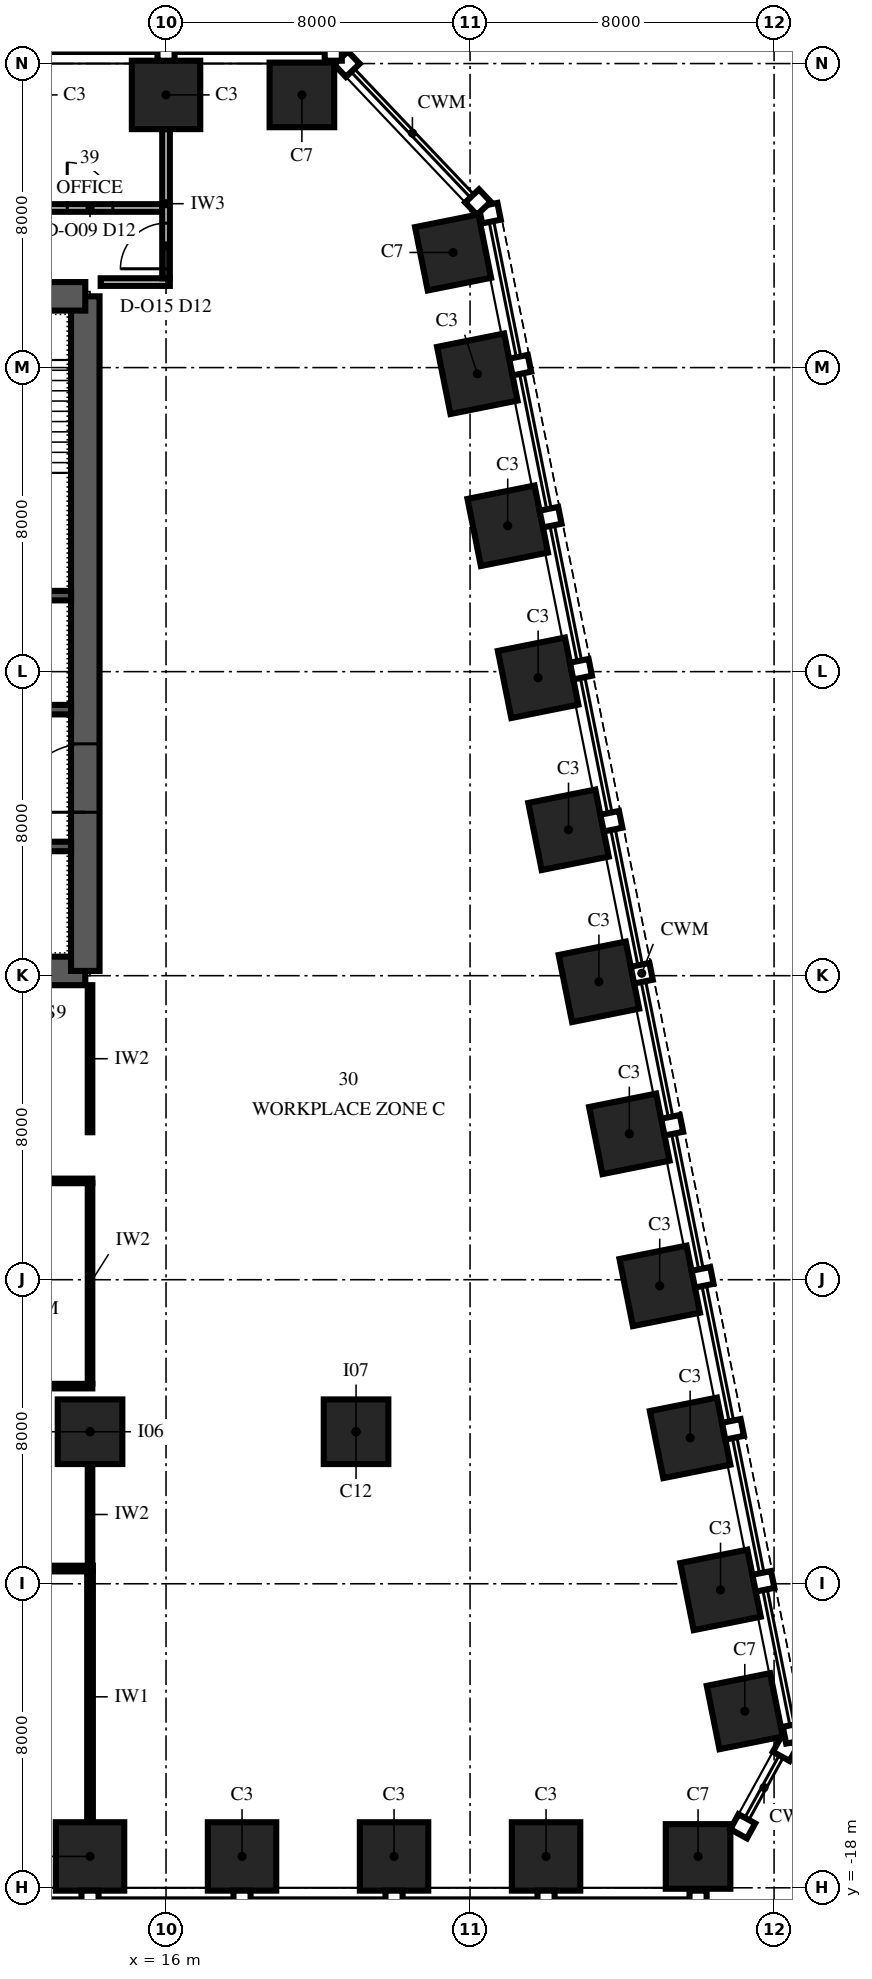
"""IFC4 building model, lengths in metres.
Left out: names, types, materials, properties, quantities, classifications, styles, units other than length and angle.
Written with IfcOpenShell. Run it as: python <this file> out.ifc"""

import sys

from ifc_helpers import new_model, si_unit, direction, frame, frame_2d, origin, origin_2d, place, context, subcontext, project, spatial, polyline, rectangle, outline, extrude, element, fill, save


model = new_model("IFC4")
c1 = context("Model", 3, precision=1e-05, world=origin(), true_north=direction((0.0, 1.0)))
c2 = subcontext(c1, "Body", "Model", "MODEL_VIEW")
j1 = project(units=[si_unit("LENGTHUNIT", "METRE"), si_unit("PLANEANGLEUNIT", "RADIAN")], contexts=[c1])
p1 = place(None, origin())
s1 = spatial("IfcSite", under=j1, at=p1, CompositionType="ELEMENT")
p2 = place(p1, origin())
s2 = spatial("IfcBuilding", under=s1, at=p2, CompositionType="ELEMENT")
p3 = place(p2, frame((0.0, 0.0, 127.0)))
s3 = spatial("IfcBuildingStorey", under=s2, at=p3, CompositionType="ELEMENT", Elevation=127.0)
for number, where, z_axis, x_axis in (
    (1, (14.0, -17.175, 0.0), (0.0, 0.0, 1.0), (1.0, 0.0, 0.0)),
    (2, (18.0, -17.175, 0.0), (0.0, 0.0, 1.0), (1.0, 0.0, 0.0)),
    (3, (22.0, -17.175, 0.0), (0.0, 0.0, 1.0), (1.0, 0.0, 0.0)),
    (4, (26.0, -17.175, 0.0), (0.0, 0.0, 1.0), (1.0, 0.0, 0.0)),
):
    element("IfcColumn", number, at=place(p3, frame(where, z_axis=z_axis, x_axis=x_axis)), inside=s3, PredefinedType="COLUMN", context=c2, shape_type="SweptSolid", body=[
        extrude(rectangle(XDim=1.8, YDim=1.8, at=origin_2d()), origin(), (0.0, 0.0, 1.0), 4.0),
    ])
for number, where, z_axis, x_axis in (
    (5, (30.0, -17.175, 0.0), (0.0, 0.0, 1.0), (1.0, 0.0, 0.0)),
    (6, (31.229, -13.353, 0.0), (0.0, 0.0, 1.0), (-0.196, 0.981, 0.0)),
):
    element("IfcColumn", number, at=place(p3, frame(where, z_axis=z_axis, x_axis=x_axis)), inside=s3, PredefinedType="COLUMN", context=c2, shape_type="SweptSolid", body=[
        extrude(rectangle(XDim=1.7, YDim=1.7, at=origin_2d()), origin(), (0.0, 0.0, 1.0), 4.0),
    ])
for number, where, z_axis, x_axis in (
    (7, (30.591, -10.162, 0.0), (0.0, 0.0, 1.0), (-0.196, 0.981, 0.0)),
    (8, (29.791, -6.162, 0.0), (0.0, 0.0, 1.0), (-0.196, 0.981, 0.0)),
    (9, (28.991, -2.162, 0.0), (0.0, 0.0, 1.0), (-0.196, 0.981, 0.0)),
    (10, (28.191, 1.838, 0.0), (0.0, 0.0, 1.0), (-0.196, 0.981, 0.0)),
    (11, (27.391, 5.838, 0.0), (0.0, 0.0, 1.0), (-0.196, 0.981, 0.0)),
    (12, (26.591, 9.838, 0.0), (0.0, 0.0, 1.0), (-0.196, 0.981, 0.0)),
    (13, (25.791, 13.838, 0.0), (0.0, 0.0, 1.0), (-0.196, 0.981, 0.0)),
    (14, (24.991, 17.838, 0.0), (0.0, 0.0, 1.0), (-0.196, 0.981, 0.0)),
    (15, (24.191, 21.838, 0.0), (0.0, 0.0, 1.0), (-0.196, 0.981, 0.0)),
):
    element("IfcColumn", number, at=place(p3, frame(where, z_axis=z_axis, x_axis=x_axis)), inside=s3, PredefinedType="COLUMN", context=c2, shape_type="SweptSolid", body=[
        extrude(rectangle(XDim=1.8, YDim=1.8, at=origin_2d()), origin(), (0.0, 0.0, 1.0), 4.0),
    ])
for number, where, z_axis, x_axis in (
    (16, (23.553, 25.029, 0.0), (0.0, 0.0, 1.0), (-0.196, 0.981, 0.0)),
    (17, (19.575, 29.175, 0.0), (0.0, 0.0, 1.0), (-1.0, 0.0, 0.0)),
):
    element("IfcColumn", number, at=place(p3, frame(where, z_axis=z_axis, x_axis=x_axis)), inside=s3, PredefinedType="COLUMN", context=c2, shape_type="SweptSolid", body=[
        extrude(rectangle(XDim=1.7, YDim=1.7, at=origin_2d()), origin(), (0.0, 0.0, 1.0), 4.0),
    ])
p4 = place(p3, frame((16.0, 29.175, 0.0), z_axis=(0.0, 0.0, 1.0), x_axis=(-1.0, 0.0, 0.0)))
e18 = element("IfcColumn", 18, at=p4, inside=s3, PredefinedType="COLUMN", context=c2, shape_type="SweptSolid", body=[
    extrude(rectangle(XDim=1.8, YDim=1.8, at=origin_2d()), origin(), (0.0, 0.0, 1.0), 4.0),
])
for number, where, z_axis, x_axis in (
    (19, (14.0, -6.0, 0.0), (0.0, 0.0, 1.0), (1.0, 0.0, 0.0)),
    (20, (21.0, -6.0, 0.0), (0.0, 0.0, 1.0), (1.0, 0.0, 0.0)),
):
    element("IfcColumn", number, at=place(p3, frame(where, z_axis=z_axis, x_axis=x_axis)), inside=s3, PredefinedType="COLUMN", context=c2, shape_type="SweptSolid", body=[
        extrude(rectangle(XDim=1.7, YDim=1.7, at=origin_2d()), origin(), (0.0, 0.0, 1.0), 4.0),
    ])
p5 = place(p3, frame((-13.875, 6.125, 0.0), z_axis=(0.0, 0.0, 1.0), x_axis=(1.0, 0.0, 0.0)))
e21 = element("IfcWall", 21, at=p5, inside=s3, PredefinedType="SHEAR", context=c2, shape_type="SweptSolid", body=[
    extrude(rectangle(XDim=27.75, YDim=0.75, at=frame_2d((13.875, 0.0))), origin(), (0.0, 0.0, 1.0), 4.0),
])
p6 = place(p3, frame((13.875, 6.125, 0.0), z_axis=(0.0, 0.0, 1.0), x_axis=(0.0, 1.0, 0.0)))
e22 = element("IfcWall", 22, at=p6, inside=s3, PredefinedType="SHEAR", context=c2, shape_type="SweptSolid", body=[
    extrude(outline(polyline([(0.0, -0.375), (17.75, -0.375), (17.75, 0.0), (17.375, 0.0), (17.375, 0.375), (0.375, 0.375), (0.375, 0.0), (0.0, 0.0), (0.0, -0.375)])), origin(), (0.0, 0.0, 1.0), 4.0),
])
p7 = place(p6, frame((4.175, 0.0, 0.0)))
e23 = element("IfcOpeningElement", 23, at=p7, cuts=e22, PredefinedType="OPENING", context=c2, shape_type="SweptSolid", body=[
    extrude(rectangle(XDim=1.8, YDim=2.4, at=frame_2d((0.9, 1.2))), frame((0.0, 0.39, 0.0), z_axis=(0.0, -1.0, 0.0), x_axis=(1.0, 0.0, 0.0)), (0.0, 0.0, 1.0), 0.78),
])
p8 = place(p3, frame((13.875, 23.875, 0.0), z_axis=(0.0, 0.0, 1.0), x_axis=(-1.0, 0.0, 0.0)))
e24 = element("IfcWall", 24, at=p8, inside=s3, PredefinedType="SHEAR", context=c2, shape_type="SweptSolid", body=[
    extrude(rectangle(XDim=27.75, YDim=0.75, at=frame_2d((13.875, 0.0))), origin(), (0.0, 0.0, 1.0), 4.0),
])
p9 = place(p8, frame((21.775, 0.0, 0.0)))
e25 = element("IfcOpeningElement", 25, at=p9, cuts=e24, PredefinedType="OPENING", context=c2, shape_type="SweptSolid", body=[
    extrude(rectangle(XDim=1.0, YDim=2.1, at=frame_2d((0.5, 1.05))), frame((0.0, 0.39, 0.0), z_axis=(0.0, -1.0, 0.0), x_axis=(1.0, 0.0, 0.0)), (0.0, 0.0, 1.0), 0.78),
])
p10 = place(p8, frame((4.975, 0.0, 0.0)))
e26 = element("IfcOpeningElement", 26, at=p10, cuts=e24, PredefinedType="OPENING", context=c2, shape_type="SweptSolid", body=[
    extrude(rectangle(XDim=1.0, YDim=2.1, at=frame_2d((0.5, 1.05))), frame((0.0, 0.39, 0.0), z_axis=(0.0, -1.0, 0.0), x_axis=(1.0, 0.0, 0.0)), (0.0, 0.0, 1.0), 0.78),
])
p11 = place(p8, frame((17.375, 0.0, 0.0)))
e27 = element("IfcOpeningElement", 27, at=p11, cuts=e24, PredefinedType="OPENING", context=c2, shape_type="SweptSolid", body=[
    extrude(rectangle(XDim=1.0, YDim=2.1, at=frame_2d((0.5, 1.05))), frame((0.0, 0.39, 0.0), z_axis=(0.0, -1.0, 0.0), x_axis=(1.0, 0.0, 0.0)), (0.0, 0.0, 1.0), 0.78),
])
p12 = place(p8, frame((13.375, 0.0, 0.0)))
e28 = element("IfcOpeningElement", 28, at=p12, cuts=e24, PredefinedType="OPENING", context=c2, shape_type="SweptSolid", body=[
    extrude(rectangle(XDim=1.0, YDim=2.1, at=frame_2d((0.5, 1.05))), frame((0.0, 0.39, 0.0), z_axis=(0.0, -1.0, 0.0), x_axis=(1.0, 0.0, 0.0)), (0.0, 0.0, 1.0), 0.78),
])
p13 = place(p8, frame((9.375, 0.0, 0.0)))
e29 = element("IfcOpeningElement", 29, at=p13, cuts=e24, PredefinedType="OPENING", context=c2, shape_type="SweptSolid", body=[
    extrude(rectangle(XDim=1.0, YDim=2.1, at=frame_2d((0.5, 1.05))), frame((0.0, 0.39, 0.0), z_axis=(0.0, -1.0, 0.0), x_axis=(1.0, 0.0, 0.0)), (0.0, 0.0, 1.0), 0.78),
])
p14 = place(p3, frame((-13.5, 9.4, 0.0), z_axis=(0.0, 0.0, 1.0), x_axis=(1.0, 0.0, 0.0)))
e30 = element("IfcWall", 30, at=p14, inside=s3, PredefinedType="SHEAR", context=c2, shape_type="SweptSolid", body=[
    extrude(rectangle(XDim=27.0, YDim=0.25, at=frame_2d((13.5, 0.0))), origin(), (0.0, 0.0, 1.0), 4.0),
])
p15 = place(p14, frame((0.35, 0.0, 0.0)))
e31 = element("IfcOpeningElement", 31, at=p15, cuts=e30, PredefinedType="OPENING", context=c2, shape_type="SweptSolid", body=[
    extrude(rectangle(XDim=1.1, YDim=2.1, at=frame_2d((0.55, 1.05))), frame((0.0, 0.14, 0.0), z_axis=(0.0, -1.0, 0.0), x_axis=(1.0, 0.0, 0.0)), (0.0, 0.0, 1.0), 0.28),
])
p16 = place(p14, frame((3.15, 0.0, 0.0)))
e32 = element("IfcOpeningElement", 32, at=p16, cuts=e30, PredefinedType="OPENING", context=c2, shape_type="SweptSolid", body=[
    extrude(rectangle(XDim=1.1, YDim=2.1, at=frame_2d((0.55, 1.05))), frame((0.0, 0.14, 0.0), z_axis=(0.0, -1.0, 0.0), x_axis=(1.0, 0.0, 0.0)), (0.0, 0.0, 1.0), 0.28),
])
p17 = place(p14, frame((5.95, 0.0, 0.0)))
e33 = element("IfcOpeningElement", 33, at=p17, cuts=e30, PredefinedType="OPENING", context=c2, shape_type="SweptSolid", body=[
    extrude(rectangle(XDim=1.1, YDim=2.1, at=frame_2d((0.55, 1.05))), frame((0.0, 0.14, 0.0), z_axis=(0.0, -1.0, 0.0), x_axis=(1.0, 0.0, 0.0)), (0.0, 0.0, 1.0), 0.28),
])
p18 = place(p3, frame((-13.5, 13.0, 0.0), z_axis=(0.0, 0.0, 1.0), x_axis=(1.0, 0.0, 0.0)))
e34 = element("IfcWall", 34, at=p18, inside=s3, PredefinedType="SHEAR", context=c2, shape_type="SweptSolid", body=[
    extrude(rectangle(XDim=27.0, YDim=0.25, at=frame_2d((13.5, 0.0))), origin(), (0.0, 0.0, 1.0), 4.0),
])
p19 = place(p18, frame((0.35, 0.0, 0.0)))
e35 = element("IfcOpeningElement", 35, at=p19, cuts=e34, PredefinedType="OPENING", context=c2, shape_type="SweptSolid", body=[
    extrude(rectangle(XDim=1.1, YDim=2.1, at=frame_2d((0.55, 1.05))), frame((0.0, 0.14, 0.0), z_axis=(0.0, -1.0, 0.0), x_axis=(1.0, 0.0, 0.0)), (0.0, 0.0, 1.0), 0.28),
])
p20 = place(p18, frame((3.15, 0.0, 0.0)))
e36 = element("IfcOpeningElement", 36, at=p20, cuts=e34, PredefinedType="OPENING", context=c2, shape_type="SweptSolid", body=[
    extrude(rectangle(XDim=1.1, YDim=2.1, at=frame_2d((0.55, 1.05))), frame((0.0, 0.14, 0.0), z_axis=(0.0, -1.0, 0.0), x_axis=(1.0, 0.0, 0.0)), (0.0, 0.0, 1.0), 0.28),
])
p21 = place(p18, frame((5.95, 0.0, 0.0)))
e37 = element("IfcOpeningElement", 37, at=p21, cuts=e34, PredefinedType="OPENING", context=c2, shape_type="SweptSolid", body=[
    extrude(rectangle(XDim=1.1, YDim=2.1, at=frame_2d((0.55, 1.05))), frame((0.0, 0.14, 0.0), z_axis=(0.0, -1.0, 0.0), x_axis=(1.0, 0.0, 0.0)), (0.0, 0.0, 1.0), 0.28),
])
p22 = place(p18, frame((14.95, 0.0, 0.0)))
e38 = element("IfcOpeningElement", 38, at=p22, cuts=e34, PredefinedType="OPENING", context=c2, shape_type="SweptSolid", body=[
    extrude(rectangle(XDim=0.9, YDim=2.1, at=frame_2d((0.45, 1.05))), frame((0.0, 0.14, 0.0), z_axis=(0.0, -1.0, 0.0), x_axis=(1.0, 0.0, 0.0)), (0.0, 0.0, 1.0), 0.28),
])
p23 = place(p18, frame((17.35, 0.0, 0.0)))
e39 = element("IfcOpeningElement", 39, at=p23, cuts=e34, PredefinedType="OPENING", context=c2, shape_type="SweptSolid", body=[
    extrude(rectangle(XDim=0.9, YDim=2.1, at=frame_2d((0.45, 1.05))), frame((0.0, 0.14, 0.0), z_axis=(0.0, -1.0, 0.0), x_axis=(1.0, 0.0, 0.0)), (0.0, 0.0, 1.0), 0.28),
])
p24 = place(p18, frame((21.05, 0.0, 0.0)))
e40 = element("IfcOpeningElement", 40, at=p24, cuts=e34, PredefinedType="OPENING", context=c2, shape_type="SweptSolid", body=[
    extrude(rectangle(XDim=0.9, YDim=2.1, at=frame_2d((0.45, 1.05))), frame((0.0, 0.14, 0.0), z_axis=(0.0, -1.0, 0.0), x_axis=(1.0, 0.0, 0.0)), (0.0, 0.0, 1.0), 0.28),
])
p25 = place(p3, frame((-13.5, 16.0, 0.0), z_axis=(0.0, 0.0, 1.0), x_axis=(1.0, 0.0, 0.0)))
e41 = element("IfcWall", 41, at=p25, inside=s3, PredefinedType="SHEAR", context=c2, shape_type="SweptSolid", body=[
    extrude(rectangle(XDim=27.0, YDim=0.25, at=frame_2d((13.5, 0.0))), origin(), (0.0, 0.0, 1.0), 4.0),
])
p26 = place(p3, frame((-10.075, -9.6, 0.0), z_axis=(0.0, 0.0, 1.0), x_axis=(1.0, 0.0, 0.0)))
e42 = element("IfcWall", 42, at=p26, inside=s3, PredefinedType="PARTITIONING", context=c2, shape_type="SweptSolid", body=[
    extrude(rectangle(XDim=24.15, YDim=0.15, at=frame_2d((12.075, 0.0))), origin(), (0.0, 0.0, 1.0), 3.25),
])
p27 = place(p26, frame((7.175, 0.0, 0.0)))
e43 = element("IfcOpeningElement", 43, at=p27, cuts=e42, PredefinedType="OPENING", context=c2, shape_type="SweptSolid", body=[
    extrude(rectangle(XDim=1.8, YDim=2.4, at=frame_2d((0.9, 1.2))), frame((0.0, 0.09, 0.0), z_axis=(0.0, -1.0, 0.0), x_axis=(1.0, 0.0, 0.0)), (0.0, 0.0, 1.0), 0.18),
])
p28 = place(p26, frame((19.175, 0.0, 0.0)))
e44 = element("IfcOpeningElement", 44, at=p28, cuts=e42, PredefinedType="OPENING", context=c2, shape_type="SweptSolid", body=[
    extrude(rectangle(XDim=1.8, YDim=2.4, at=frame_2d((0.9, 1.2))), frame((0.0, 0.09, 0.0), z_axis=(0.0, -1.0, 0.0), x_axis=(1.0, 0.0, 0.0)), (0.0, 0.0, 1.0), 0.18),
])
p29 = place(p3, frame((7.94, -4.8, 0.0), z_axis=(0.0, 0.0, 1.0), x_axis=(1.0, 0.0, 0.0)))
e45 = element("IfcWall", 45, at=p29, inside=s3, PredefinedType="PARTITIONING", context=c2, shape_type="SweptSolid", body=[
    extrude(rectangle(XDim=6.12, YDim=0.12, at=frame_2d((3.06, 0.0))), origin(), (0.0, 0.0, 1.0), 3.25),
])
p30 = place(p3, frame((7.94, 0.6, 0.0), z_axis=(0.0, 0.0, 1.0), x_axis=(1.0, 0.0, 0.0)))
e46 = element("IfcWall", 46, at=p30, inside=s3, PredefinedType="PARTITIONING", context=c2, shape_type="SweptSolid", body=[
    extrude(rectangle(XDim=6.12, YDim=0.12, at=frame_2d((3.06, 0.0))), origin(), (0.0, 0.0, 1.0), 3.25),
])
p31 = place(p30, frame((2.56, 0.0, 0.0)))
e47 = element("IfcOpeningElement", 47, at=p31, cuts=e46, PredefinedType="OPENING", context=c2, shape_type="SweptSolid", body=[
    extrude(rectangle(XDim=1.0, YDim=2.4, at=frame_2d((0.5, 1.2))), frame((0.0, 0.075, 0.0), z_axis=(0.0, -1.0, 0.0), x_axis=(1.0, 0.0, 0.0)), (0.0, 0.0, 1.0), 0.15),
])
p32 = place(p3, frame((14.28, 24.25, 0.0), z_axis=(0.0, 0.0, 1.0), x_axis=(1.0, 0.0, 0.0)))
e48 = element("IfcWall", 48, at=p32, inside=s3, PredefinedType="PARTITIONING", context=c2, shape_type="SweptSolid", body=[
    extrude(rectangle(XDim=1.82, YDim=0.2, at=frame_2d((0.91, 0.0))), origin(), (0.0, 0.0, 1.0), 3.4),
])
p33 = place(p3, frame((-16.3, 26.2, 0.0), z_axis=(0.0, 0.0, 1.0), x_axis=(1.0, 0.0, 0.0)))
e49 = element("IfcWall", 49, at=p33, inside=s3, PredefinedType="PARTITIONING", context=c2, shape_type="SweptSolid", body=[
    extrude(rectangle(XDim=32.2, YDim=0.2, at=frame_2d((16.1, 0.0))), origin(), (0.0, 0.0, 1.0), 3.4),
])
p34 = place(p33, frame((1.7, 0.0, 0.0)))
e50 = element("IfcOpeningElement", 50, at=p34, cuts=e49, PredefinedType="OPENING", context=c2, shape_type="SweptSolid", body=[
    extrude(rectangle(XDim=1.2, YDim=2.4, at=frame_2d((0.6, 1.2))), frame((0.0, 0.115, 0.0), z_axis=(0.0, -1.0, 0.0), x_axis=(1.0, 0.0, 0.0)), (0.0, 0.0, 1.0), 0.23),
])
p35 = place(p33, frame((5.7, 0.0, 0.0)))
e51 = element("IfcOpeningElement", 51, at=p35, cuts=e49, PredefinedType="OPENING", context=c2, shape_type="SweptSolid", body=[
    extrude(rectangle(XDim=1.2, YDim=2.4, at=frame_2d((0.6, 1.2))), frame((0.0, 0.115, 0.0), z_axis=(0.0, -1.0, 0.0), x_axis=(1.0, 0.0, 0.0)), (0.0, 0.0, 1.0), 0.23),
])
p36 = place(p33, frame((9.7, 0.0, 0.0)))
e52 = element("IfcOpeningElement", 52, at=p36, cuts=e49, PredefinedType="OPENING", context=c2, shape_type="SweptSolid", body=[
    extrude(rectangle(XDim=1.2, YDim=2.4, at=frame_2d((0.6, 1.2))), frame((0.0, 0.115, 0.0), z_axis=(0.0, -1.0, 0.0), x_axis=(1.0, 0.0, 0.0)), (0.0, 0.0, 1.0), 0.23),
])
p37 = place(p33, frame((15.7, 0.0, 0.0)))
e53 = element("IfcOpeningElement", 53, at=p37, cuts=e49, PredefinedType="OPENING", context=c2, shape_type="SweptSolid", body=[
    extrude(rectangle(XDim=1.2, YDim=2.4, at=frame_2d((0.6, 1.2))), frame((0.0, 0.115, 0.0), z_axis=(0.0, -1.0, 0.0), x_axis=(1.0, 0.0, 0.0)), (0.0, 0.0, 1.0), 0.23),
])
p38 = place(p33, frame((21.7, 0.0, 0.0)))
e54 = element("IfcOpeningElement", 54, at=p38, cuts=e49, PredefinedType="OPENING", context=c2, shape_type="SweptSolid", body=[
    extrude(rectangle(XDim=1.2, YDim=2.4, at=frame_2d((0.6, 1.2))), frame((0.0, 0.115, 0.0), z_axis=(0.0, -1.0, 0.0), x_axis=(1.0, 0.0, 0.0)), (0.0, 0.0, 1.0), 0.23),
])
p39 = place(p33, frame((25.7, 0.0, 0.0)))
e55 = element("IfcOpeningElement", 55, at=p39, cuts=e49, PredefinedType="OPENING", context=c2, shape_type="SweptSolid", body=[
    extrude(rectangle(XDim=1.2, YDim=2.4, at=frame_2d((0.6, 1.2))), frame((0.0, 0.115, 0.0), z_axis=(0.0, -1.0, 0.0), x_axis=(1.0, 0.0, 0.0)), (0.0, 0.0, 1.0), 0.23),
])
p40 = place(p33, frame((29.7, 0.0, 0.0)))
e56 = element("IfcOpeningElement", 56, at=p40, cuts=e49, PredefinedType="OPENING", context=c2, shape_type="SweptSolid", body=[
    extrude(rectangle(XDim=1.2, YDim=2.4, at=frame_2d((0.6, 1.2))), frame((0.0, 0.115, 0.0), z_axis=(0.0, -1.0, 0.0), x_axis=(1.0, 0.0, 0.0)), (0.0, 0.0, 1.0), 0.23),
])
p41 = place(p3, frame((14.0, -16.275, 0.0), z_axis=(0.0, 0.0, 1.0), x_axis=(0.0, 1.0, 0.0)))
e57 = element("IfcWall", 57, at=p41, inside=s3, PredefinedType="PARTITIONING", context=c2, shape_type="SweptSolid", body=[
    extrude(rectangle(XDim=6.6, YDim=0.15, at=frame_2d((3.3, 0.0))), origin(), (0.0, 0.0, 1.0), 3.25),
])
p42 = place(p3, frame((14.0, -4.74, 0.0), z_axis=(0.0, 0.0, 1.0), x_axis=(0.0, 1.0, 0.0)))
e58 = element("IfcWall", 58, at=p42, inside=s3, PredefinedType="PARTITIONING", context=c2, shape_type="SweptSolid", body=[
    extrude(rectangle(XDim=5.28, YDim=0.12, at=frame_2d((2.64, 0.0))), origin(), (0.0, 0.0, 1.0), 3.25),
])
p43 = place(p3, frame((16.0, 24.35, 0.0), z_axis=(0.0, 0.0, 1.0), x_axis=(0.0, 1.0, 0.0)))
e59 = element("IfcWall", 59, at=p43, inside=s3, PredefinedType="PARTITIONING", context=c2, shape_type="SweptSolid", body=[
    extrude(rectangle(XDim=3.925, YDim=0.2, at=frame_2d((1.962, 0.0))), origin(), (0.0, 0.0, 1.0), 3.4),
])
p44 = place(p43, frame((0.25, 0.0, 0.0)))
e60 = element("IfcOpeningElement", 60, at=p44, cuts=e59, PredefinedType="OPENING", context=c2, shape_type="SweptSolid", body=[
    extrude(rectangle(XDim=1.2, YDim=2.4, at=frame_2d((0.6, 1.2))), frame((0.0, 0.115, 0.0), z_axis=(0.0, -1.0, 0.0), x_axis=(1.0, 0.0, 0.0)), (0.0, 0.0, 1.0), 0.23),
])
p45 = place(p3, frame((14.0, -9.505, 0.0), z_axis=(0.0, 0.0, 1.0), x_axis=(0.0, 1.0, 0.0)))
e61 = element("IfcWall", 61, at=p45, inside=s3, PredefinedType="PARTITIONING", context=c2, shape_type="SweptSolid", body=[
    extrude(rectangle(XDim=2.655, YDim=0.12, at=frame_2d((1.327, 0.0))), origin(), (0.0, 0.0, 1.0), 3.25),
])
p46 = place(p3, frame((14.0, 1.88, 0.0), z_axis=(0.0, 0.0, 1.0), x_axis=(0.0, 1.0, 0.0)))
e62 = element("IfcWall", 62, at=p46, inside=s3, PredefinedType="PARTITIONING", context=c2, shape_type="SweptSolid", body=[
    extrude(rectangle(XDim=3.87, YDim=0.12, at=frame_2d((1.935, 0.0))), origin(), (0.0, 0.0, 1.0), 3.25),
])
p47 = place(p7, origin())
e63 = element("IfcDoor", 63, at=p47, inside=s3, OperationType="DOUBLE_DOOR_SINGLE_SWING", PredefinedType="DOOR", context=c2, shape_type="SweptSolid", body=[
    extrude(rectangle(XDim=1.8, YDim=2.4, at=frame_2d((0.9, 1.2))), frame((0.0, 0.375, 0.0), z_axis=(0.0, -1.0, 0.0), x_axis=(1.0, 0.0, 0.0)), (0.0, 0.0, 1.0), 0.75),
])
fill(e23, e63)
p48 = place(p40, origin())
e64 = element("IfcDoor", 64, at=p48, inside=s3, OperationType="SINGLE_SWING_LEFT", PredefinedType="DOOR", context=c2, shape_type="SweptSolid", body=[
    extrude(rectangle(XDim=1.2, YDim=2.4, at=frame_2d((0.6, 1.2))), frame((0.0, 0.1, 0.0), z_axis=(0.0, -1.0, 0.0), x_axis=(1.0, 0.0, 0.0)), (0.0, 0.0, 1.0), 0.199),
])
fill(e56, e64)
p49 = place(p44, origin())
e65 = element("IfcDoor", 65, at=p49, inside=s3, OperationType="SINGLE_SWING_LEFT", PredefinedType="DOOR", context=c2, shape_type="SweptSolid", body=[
    extrude(rectangle(XDim=1.2, YDim=2.4, at=frame_2d((0.6, 1.2))), frame((0.0, 0.1, 0.0), z_axis=(0.0, -1.0, 0.0), x_axis=(1.0, 0.0, 0.0)), (0.0, 0.0, 1.0), 0.199),
])
fill(e60, e65)
save(model, sys.argv[1])
